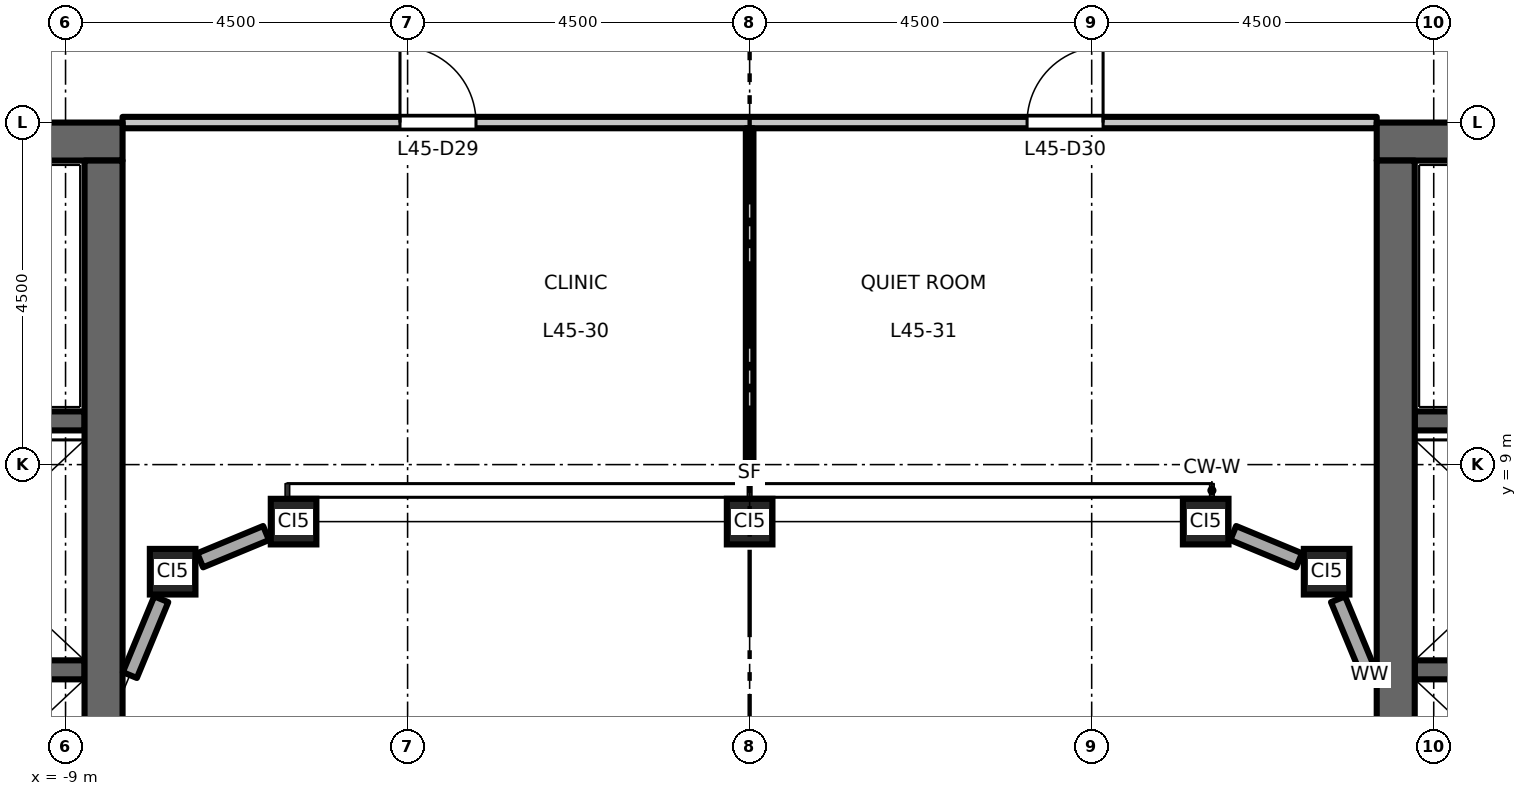
"""IFC4 building model, lengths in metres.
Left out: names, types, materials, properties, quantities, classifications, styles, units other than length and angle.
Written with IfcOpenShell. Run it as: python <this file> out.ifc"""

import sys

from ifc_helpers import new_model, si_unit, direction, frame, frame_2d, origin, origin_2d, place, context, subcontext, project, spatial, rectangle, hollow_rectangle, extrude, element, fill, save


model = new_model("IFC4")
c1 = context("Model", 3, precision=1e-05, world=origin(), true_north=direction((0.0, 1.0)))
c2 = subcontext(c1, "Body", "Model", "MODEL_VIEW")
j1 = project(units=[si_unit("LENGTHUNIT", "METRE"), si_unit("PLANEANGLEUNIT", "RADIAN")], contexts=[c1])
p1 = place(None, origin())
s1 = spatial("IfcSite", under=j1, at=p1, CompositionType="ELEMENT")
p2 = place(p1, origin())
s2 = spatial("IfcBuilding", under=s1, at=p2, CompositionType="ELEMENT")
p3 = place(p2, frame((0.0, 0.0, 210.7)))
s3 = spatial("IfcBuildingStorey", under=s2, at=p3, CompositionType="ELEMENT", Elevation=210.7)
for number, where, z_axis, x_axis in (
    (1, (-7.591, 7.591, 0.0), (0.0, 0.0, 1.0), (1.0, 0.0, 0.0)),
    (2, (-6.0, 8.25, 0.0), (0.0, 0.0, 1.0), (1.0, 0.0, 0.0)),
    (3, (0.0, 8.25, 0.0), (0.0, 0.0, 1.0), (1.0, 0.0, 0.0)),
    (4, (6.0, 8.25, 0.0), (0.0, 0.0, 1.0), (1.0, 0.0, 0.0)),
    (5, (7.591, 7.591, 0.0), (0.0, 0.0, 1.0), (1.0, 0.0, 0.0)),
):
    element("IfcColumn", number, at=place(p3, frame(where, z_axis=z_axis, x_axis=x_axis)), inside=s3, PredefinedType="COLUMN", context=c2, shape_type="SweptSolid", body=[
        extrude(hollow_rectangle(XDim=0.6, YDim=0.6, WallThickness=0.032, at=origin_2d()), origin(), (0.0, 0.0, 1.0), 4.5),
    ])
p4 = place(p3, frame((-8.75, 6.3, 0.0), z_axis=(0.0, 0.0, 1.0), x_axis=(-1.0, 0.0, 0.0)))
e6 = element("IfcWall", 6, at=p4, inside=s3, PredefinedType="SHEAR", context=c2, shape_type="SweptSolid", body=[
    extrude(rectangle(XDim=3.1, YDim=0.25, at=frame_2d((1.55, 0.0))), origin(), (0.0, 0.0, 1.0), 4.35),
])
p5 = place(p3, frame((-8.75, 9.575, 0.0), z_axis=(0.0, 0.0, 1.0), x_axis=(-1.0, 0.0, 0.0)))
e7 = element("IfcWall", 7, at=p5, inside=s3, PredefinedType="SHEAR", context=c2, shape_type="SweptSolid", body=[
    extrude(rectangle(XDim=8.0, YDim=0.25, at=frame_2d((4.0, 0.0))), origin(), (0.0, 0.0, 1.0), 4.35),
])
p6 = place(p5, frame((6.65, 0.0, 0.0)))
e8 = element("IfcOpeningElement", 8, at=p6, cuts=e7, PredefinedType="OPENING", context=c2, shape_type="SweptSolid", body=[
    extrude(rectangle(XDim=1.1, YDim=2.1, at=frame_2d((0.55, 1.05))), frame((0.0, 0.135, 0.0), z_axis=(0.0, -1.0, 0.0), x_axis=(1.0, 0.0, 0.0)), (0.0, 0.0, 1.0), 0.27),
])
p7 = place(p3, frame((-8.25, 13.25, 0.0), z_axis=(0.0, 0.0, 1.0), x_axis=(-1.0, 0.0, 0.0)))
e9 = element("IfcWall", 9, at=p7, inside=s3, PredefinedType="SHEAR", context=c2, shape_type="SweptSolid", body=[
    extrude(rectangle(XDim=13.5, YDim=0.5, at=frame_2d((6.75, 0.0))), origin(), (0.0, 0.0, 1.0), 4.35),
])
p8 = place(p3, frame((-8.5, -13.0, 0.0), z_axis=(0.0, 0.0, 1.0), x_axis=(0.0, 1.0, 0.0)))
e10 = element("IfcWall", 10, at=p8, inside=s3, PredefinedType="SHEAR", context=c2, shape_type="SweptSolid", body=[
    extrude(rectangle(XDim=26.0, YDim=0.5, at=frame_2d((13.0, 0.0))), origin(), (0.0, 0.0, 1.0), 4.35),
])
p9 = place(p3, frame((8.75, 6.3, 0.0), z_axis=(0.0, 0.0, 1.0), x_axis=(1.0, 0.0, 0.0)))
e11 = element("IfcWall", 11, at=p9, inside=s3, PredefinedType="SHEAR", context=c2, shape_type="SweptSolid", body=[
    extrude(rectangle(XDim=3.1, YDim=0.25, at=frame_2d((1.55, 0.0))), origin(), (0.0, 0.0, 1.0), 4.35),
])
p10 = place(p3, frame((8.75, 9.575, 0.0), z_axis=(0.0, 0.0, 1.0), x_axis=(1.0, 0.0, 0.0)))
e12 = element("IfcWall", 12, at=p10, inside=s3, PredefinedType="SHEAR", context=c2, shape_type="SweptSolid", body=[
    extrude(rectangle(XDim=8.0, YDim=0.25, at=frame_2d((4.0, 0.0))), origin(), (0.0, 0.0, 1.0), 4.35),
])
p11 = place(p10, frame((6.65, 0.0, 0.0)))
e13 = element("IfcOpeningElement", 13, at=p11, cuts=e12, PredefinedType="OPENING", context=c2, shape_type="SweptSolid", body=[
    extrude(rectangle(XDim=1.1, YDim=2.1, at=frame_2d((0.55, 1.05))), frame((0.0, 0.135, 0.0), z_axis=(0.0, -1.0, 0.0), x_axis=(1.0, 0.0, 0.0)), (0.0, 0.0, 1.0), 0.27),
])
p12 = place(p3, frame((8.25, 13.25, 0.0), z_axis=(0.0, 0.0, 1.0), x_axis=(1.0, 0.0, 0.0)))
e14 = element("IfcWall", 14, at=p12, inside=s3, PredefinedType="SHEAR", context=c2, shape_type="SweptSolid", body=[
    extrude(rectangle(XDim=13.5, YDim=0.5, at=frame_2d((6.75, 0.0))), origin(), (0.0, 0.0, 1.0), 4.35),
])
p13 = place(p3, frame((8.5, -13.0, 0.0), z_axis=(0.0, 0.0, 1.0), x_axis=(0.0, 1.0, 0.0)))
e15 = element("IfcWall", 15, at=p13, inside=s3, PredefinedType="SHEAR", context=c2, shape_type="SweptSolid", body=[
    extrude(rectangle(XDim=26.0, YDim=0.5, at=frame_2d((13.0, 0.0))), origin(), (0.0, 0.0, 1.0), 4.35),
])
p14 = place(p3, frame((8.154, 6.231, 0.0), z_axis=(0.0, 0.0, 1.0), x_axis=(-0.382704496366, 0.923870807235, 0.0)))
e16 = element("IfcWall", 16, at=p14, inside=s3, PredefinedType="STANDARD", context=c2, shape_type="SweptSolid", body=[
    extrude(rectangle(XDim=1.08, YDim=0.2, at=frame_2d((0.54, 0.0))), origin(), (0.0, 0.0, 1.0), 3.918),
])
for number, where, z_axis, x_axis in (
    (17, (7.229, 7.741, 0.0), (0.0, 0.0, 1.0), (-0.924, 0.383, 0.0)),
    (18, (-6.362, 8.1, 0.0), (0.0, 0.0, 1.0), (-0.924, -0.383, 0.0)),
):
    element("IfcWall", number, at=place(p3, frame(where, z_axis=z_axis, x_axis=x_axis)), inside=s3, PredefinedType="STANDARD", context=c2, shape_type="SweptSolid", body=[
        extrude(rectangle(XDim=0.938, YDim=0.2, at=frame_2d((0.469, 0.0))), origin(), (0.0, 0.0, 1.0), 3.918),
    ])
p15 = place(p3, frame((-7.741, 7.229, 0.0), z_axis=(0.0, 0.0, 1.0), x_axis=(-0.382704496366, -0.923870807235, 0.0)))
e19 = element("IfcWall", 19, at=p15, inside=s3, PredefinedType="STANDARD", context=c2, shape_type="SweptSolid", body=[
    extrude(rectangle(XDim=1.08, YDim=0.2, at=frame_2d((0.54, 0.0))), origin(), (0.0, 0.0, 1.0), 3.918),
])
p16 = place(p3, frame((-8.25, 13.5, 0.0), z_axis=(0.0, 0.0, 1.0), x_axis=(1.0, 0.0, 0.0)))
e20 = element("IfcWall", 20, at=p16, inside=s3, PredefinedType="PARTITIONING", context=c2, shape_type="SweptSolid", body=[
    extrude(rectangle(XDim=16.5, YDim=0.15, at=frame_2d((8.25, 0.0))), origin(), (0.0, 0.0, 1.0), 4.35),
])
p17 = place(p16, frame((3.65, 0.0, 0.0)))
e21 = element("IfcOpeningElement", 21, at=p17, cuts=e20, PredefinedType="OPENING", context=c2, shape_type="SweptSolid", body=[
    extrude(rectangle(XDim=1.0, YDim=2.1, at=frame_2d((0.5, 1.05))), frame((0.0, 0.085, 0.0), z_axis=(0.0, -1.0, 0.0), x_axis=(1.0, 0.0, 0.0)), (0.0, 0.0, 1.0), 0.17),
])
p18 = place(p16, frame((11.9, 0.0, 0.0)))
e22 = element("IfcOpeningElement", 22, at=p18, cuts=e20, PredefinedType="OPENING", context=c2, shape_type="SweptSolid", body=[
    extrude(rectangle(XDim=1.0, YDim=2.1, at=frame_2d((0.5, 1.05))), frame((0.0, 0.085, 0.0), z_axis=(0.0, -1.0, 0.0), x_axis=(1.0, 0.0, 0.0)), (0.0, 0.0, 1.0), 0.17),
])
p19 = place(p3, frame((0.0, 8.6, 0.0), z_axis=(0.0, 0.0, 1.0), x_axis=(0.0, 1.0, 0.0)))
e23 = element("IfcWall", 23, at=p19, inside=s3, PredefinedType="PARTITIONING", context=c2, shape_type="SweptSolid", body=[
    extrude(rectangle(XDim=4.825, YDim=0.1, at=frame_2d((2.413, 0.0))), origin(), (0.0, 0.0, 1.0), 3.55),
])
p20 = place(p17, origin())
e24 = element("IfcDoor", 24, at=p20, inside=s3, OperationType="SINGLE_SWING_LEFT", PredefinedType="DOOR", context=c2, shape_type="SweptSolid", body=[
    extrude(rectangle(XDim=1.0, YDim=2.1, at=frame_2d((0.5, 1.05))), frame((0.0, 0.025, 0.0), z_axis=(0.0, -1.0, 0.0), x_axis=(1.0, 0.0, 0.0)), (0.0, 0.0, 1.0), 0.05),
])
fill(e21, e24)
p21 = place(p18, origin())
e25 = element("IfcDoor", 25, at=p21, inside=s3, OperationType="SINGLE_SWING_RIGHT", PredefinedType="DOOR", context=c2, shape_type="SweptSolid", body=[
    extrude(rectangle(XDim=1.0, YDim=2.1, at=frame_2d((0.5, 1.05))), frame((0.0, 0.025, 0.0), z_axis=(0.0, -1.0, 0.0), x_axis=(1.0, 0.0, 0.0)), (0.0, 0.0, 1.0), 0.05),
])
fill(e22, e25)
save(model, sys.argv[1])
